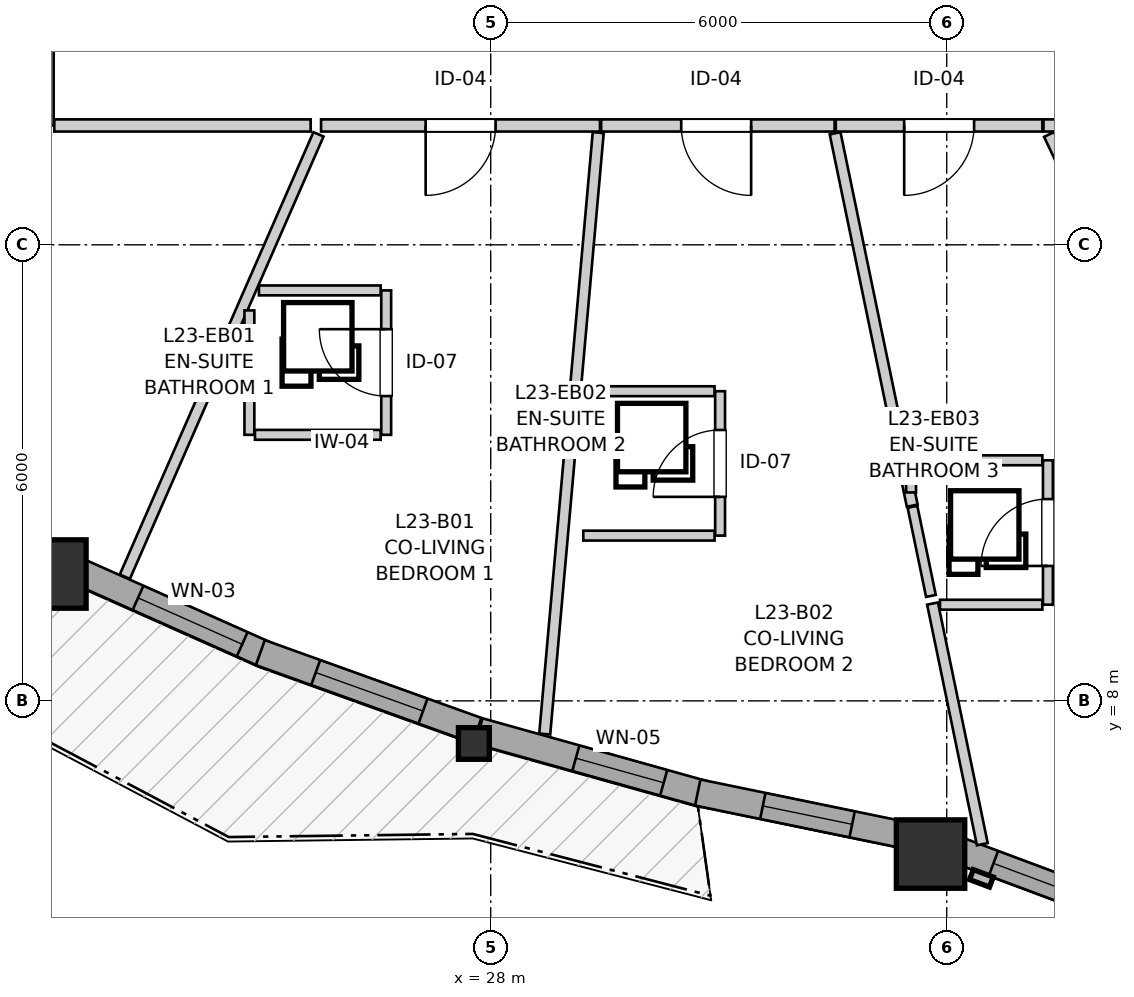
"""IFC4 building model, lengths in metres.
Left out: names, types, materials, properties, quantities, classifications, styles, units other than length and angle.
Written with IfcOpenShell. Run it as: python <this file> out.ifc"""

import sys

from ifc_helpers import new_model, si_unit, direction, frame, frame_2d, origin, origin_2d, place, context, subcontext, project, spatial, rectangle, i_section, extrude, source, transform, mapped, element, fill, save


model = new_model("IFC4")
c1 = context("Model", 3, precision=1e-05, world=origin(), true_north=direction((0.0, 1.0)))
c2 = subcontext(c1, "Body", "Model", "MODEL_VIEW")
j1 = project(units=[si_unit("LENGTHUNIT", "METRE"), si_unit("PLANEANGLEUNIT", "RADIAN")], contexts=[c1])
p1 = place(None, origin())
s1 = spatial("IfcSite", under=j1, at=p1, CompositionType="ELEMENT")
p2 = place(p1, origin())
s2 = spatial("IfcBuilding", under=s1, at=p2, CompositionType="ELEMENT")
p3 = place(p2, frame((0.0, 0.0, 80.0)))
s3 = spatial("IfcBuildingStorey", under=s2, at=p3, CompositionType="ELEMENT", Elevation=80.0)
m1 = source(origin(), c2, "Body", "SweptSolid", [
    extrude(rectangle(XDim=0.9, YDim=0.9, at=origin_2d()), origin(), (0.0, 0.0, 1.0), 2.935),
])
p4 = place(p3, frame((22.227, 9.669, 0.0), z_axis=(0.0, 0.0, 1.0), x_axis=(1.0, 0.0, 0.0)))
e1 = element("IfcColumn", 1, at=p4, inside=s3, PredefinedType="COLUMN", context=c2, shape_type="MappedRepresentation", body=[
    mapped(m1, transform((0.0, 0.0, 0.0), x_axis=(1.0, 0.0, 0.0), y_axis=(0.0, 1.0, 0.0), z_axis=(0.0, 0.0, 1.0), scale=1.0)),
])
m2 = source(origin(), c2, "Body", "SweptSolid", [
    extrude(i_section(OverallWidth=0.406, OverallDepth=0.416, WebThickness=0.027, FlangeThickness=0.044, FilletRadius=0.015, at=origin_2d()), origin(), (0.0, 0.0, 1.0), 2.935),
])
p5 = place(p3, frame((27.779, 7.439, 0.0), z_axis=(0.0, 0.0, 1.0), x_axis=(1.0, 0.0, 0.0)))
e2 = element("IfcColumn", 2, at=p5, inside=s3, PredefinedType="PILASTER", context=c2, shape_type="MappedRepresentation", body=[
    mapped(m2, transform((0.0, 0.0, 0.0), x_axis=(1.0, 0.0, 0.0), y_axis=(0.0, 1.0, 0.0), z_axis=(0.0, 0.0, 1.0), scale=1.0)),
])
p6 = place(p3, frame((33.787, 5.985, 0.0), z_axis=(0.0, 0.0, 1.0), x_axis=(1.0, 0.0, 0.0)))
e3 = element("IfcColumn", 3, at=p6, inside=s3, PredefinedType="COLUMN", context=c2, shape_type="MappedRepresentation", body=[
    mapped(m1, transform((0.0, 0.0, 0.0), x_axis=(1.0, 0.0, 0.0), y_axis=(0.0, 1.0, 0.0), z_axis=(0.0, 0.0, 1.0), scale=1.0)),
])
p7 = place(p3, frame((22.503, 9.737, 0.0), z_axis=(0.0, 0.0, 1.0), x_axis=(0.913443049169, -0.406966578388, 0.0)))
e4 = element("IfcWall", 4, at=p7, inside=s3, PredefinedType="SOLIDWALL", context=c2, shape_type="SweptSolid", body=[
    extrude(rectangle(XDim=2.79, YDim=0.35, at=frame_2d((1.395, 0.0))), origin(), (0.0, 0.0, 1.0), 2.465),
])
p8 = place(p7, frame((0.938, 0.0, 0.82)))
e5 = element("IfcOpeningElement", 5, at=p8, cuts=e4, PredefinedType="OPENING", context=c2, shape_type="SweptSolid", body=[
    extrude(rectangle(XDim=1.5, YDim=1.45, at=frame_2d((0.75, 0.725))), frame((0.0, 0.185, 0.0), z_axis=(0.0, -1.0, 0.0), x_axis=(1.0, 0.0, 0.0)), (0.0, 0.0, 1.0), 0.37),
])
p9 = place(p3, frame((24.969, 8.635, 0.0), z_axis=(0.0, 0.0, 1.0), x_axis=(0.941099972293, -0.338128440315, 0.0)))
e6 = element("IfcWall", 6, at=p9, inside=s3, PredefinedType="SOLIDWALL", context=c2, shape_type="SweptSolid", body=[
    extrude(rectangle(XDim=3.028, YDim=0.35, at=frame_2d((1.514, 0.0))), origin(), (0.0, 0.0, 1.0), 2.465),
])
p10 = place(p9, frame((0.774, 0.0, 0.82)))
e7 = element("IfcOpeningElement", 7, at=p10, cuts=e6, PredefinedType="OPENING", context=c2, shape_type="SweptSolid", body=[
    extrude(rectangle(XDim=1.5, YDim=1.45, at=frame_2d((0.75, 0.725))), frame((0.0, 0.185, 0.0), z_axis=(0.0, -1.0, 0.0), x_axis=(1.0, 0.0, 0.0)), (0.0, 0.0, 1.0), 0.37),
])
p11 = place(p3, frame((27.845, 7.603, 0.0), z_axis=(0.0, 0.0, 1.0), x_axis=(0.963041412051, -0.269353371382, 0.0)))
e8 = element("IfcWall", 8, at=p11, inside=s3, PredefinedType="SOLIDWALL", context=c2, shape_type="SweptSolid", body=[
    extrude(rectangle(XDim=3.078, YDim=0.35, at=frame_2d((1.539, 0.0))), origin(), (0.0, 0.0, 1.0), 2.465),
])
p12 = place(p11, frame((1.324, 0.0, 0.82)))
e9 = element("IfcOpeningElement", 9, at=p12, cuts=e8, PredefinedType="OPENING", context=c2, shape_type="SweptSolid", body=[
    extrude(rectangle(XDim=1.2, YDim=1.45, at=frame_2d((0.6, 0.725))), frame((0.0, 0.185, 0.0), z_axis=(0.0, -1.0, 0.0), x_axis=(1.0, 0.0, 0.0)), (0.0, 0.0, 1.0), 0.37),
])
p13 = place(p3, frame((30.724, 6.794, 0.0), z_axis=(0.0, 0.0, 1.0), x_axis=(0.979439663571, -0.201737317878, 0.0)))
e10 = element("IfcWall", 10, at=p13, inside=s3, PredefinedType="SOLIDWALL", context=c2, shape_type="SweptSolid", body=[
    extrude(rectangle(XDim=2.938, YDim=0.35, at=frame_2d((1.469, 0.0))), origin(), (0.0, 0.0, 1.0), 2.465),
])
p14 = place(p13, frame((0.874, 0.0, 0.82)))
e11 = element("IfcOpeningElement", 11, at=p14, cuts=e10, PredefinedType="OPENING", context=c2, shape_type="SweptSolid", body=[
    extrude(rectangle(XDim=1.2, YDim=1.45, at=frame_2d((0.6, 0.725))), frame((0.0, 0.185, 0.0), z_axis=(0.0, -1.0, 0.0), x_axis=(1.0, 0.0, 0.0)), (0.0, 0.0, 1.0), 0.37),
])
p15 = place(p3, frame((34.059, 6.07, 0.0), z_axis=(0.0, 0.0, 1.0), x_axis=(0.936803747811, -0.349855310219, 0.0)))
e12 = element("IfcWall", 12, at=p15, inside=s3, PredefinedType="SOLIDWALL", context=c2, shape_type="SweptSolid", body=[
    extrude(rectangle(XDim=1.836, YDim=0.35, at=frame_2d((0.918, 0.0))), origin(), (0.0, 0.0, 1.0), 2.465),
])
p16 = place(p15, frame((0.593, 0.0, 0.82)))
e13 = element("IfcOpeningElement", 13, at=p16, cuts=e12, PredefinedType="OPENING", context=c2, shape_type="SweptSolid", body=[
    extrude(rectangle(XDim=0.95, YDim=1.35, at=frame_2d((0.475, 0.675))), frame((0.0, 0.185, 0.0), z_axis=(0.0, -1.0, 0.0), x_axis=(1.0, 0.0, 0.0)), (0.0, 0.0, 1.0), 0.37),
])
p17 = place(p3, frame((22.17, 15.57, 0.0), z_axis=(0.0, 0.0, 1.0), x_axis=(0.0, 1.0, 0.0)))
e14 = element("IfcWall", 14, at=p17, inside=s3, PredefinedType="PARTITIONING", context=c2, shape_type="SweptSolid", body=[
    extrude(rectangle(XDim=5.543, YDim=0.16, at=frame_2d((2.771, 0.0))), origin(), (0.0, 0.0, 1.0), 2.935),
])
p18 = place(p17, frame((2.283, 0.0, 0.0)))
e15 = element("IfcOpeningElement", 15, at=p18, cuts=e14, PredefinedType="OPENING", context=c2, shape_type="SweptSolid", body=[
    extrude(rectangle(XDim=0.96, YDim=2.1, at=frame_2d((0.48, 1.05))), frame((0.0, 0.09, 0.0), z_axis=(0.0, -1.0, 0.0), x_axis=(1.0, 0.0, 0.0)), (0.0, 0.0, 1.0), 0.18),
])
p19 = place(p3, frame((29.438, 15.57, 0.0), z_axis=(0.0, 0.0, 1.0), x_axis=(-1.0, 0.0, 0.0)))
e16 = element("IfcWall", 16, at=p19, inside=s3, PredefinedType="PARTITIONING", context=c2, shape_type="SweptSolid", body=[
    extrude(rectangle(XDim=3.67, YDim=0.16, at=frame_2d((1.835, 0.0))), origin(), (0.0, 0.0, 1.0), 2.935),
])
p20 = place(p19, frame((1.374, 0.0, 0.0)))
e17 = element("IfcOpeningElement", 17, at=p20, cuts=e16, PredefinedType="OPENING", context=c2, shape_type="SweptSolid", body=[
    extrude(rectangle(XDim=0.92, YDim=2.1, at=frame_2d((0.46, 1.05))), frame((0.0, 0.09, 0.0), z_axis=(0.0, -1.0, 0.0), x_axis=(1.0, 0.0, 0.0)), (0.0, 0.0, 1.0), 0.18),
])
p21 = place(p3, frame((38.53, 15.57, 0.0), z_axis=(0.0, 0.0, 1.0), x_axis=(-1.0, 0.0, 0.0)))
e18 = element("IfcWall", 18, at=p21, inside=s3, PredefinedType="PARTITIONING", context=c2, shape_type="SweptSolid", body=[
    extrude(rectangle(XDim=3.257, YDim=0.16, at=frame_2d((1.628, 0.0))), origin(), (0.0, 0.0, 1.0), 2.935),
])
p22 = place(p21, frame((1.16, 0.0, 0.0)))
e19 = element("IfcOpeningElement", 19, at=p22, cuts=e18, PredefinedType="OPENING", context=c2, shape_type="SweptSolid", body=[
    extrude(rectangle(XDim=0.92, YDim=2.1, at=frame_2d((0.46, 1.05))), frame((0.0, 0.09, 0.0), z_axis=(0.0, -1.0, 0.0), x_axis=(1.0, 0.0, 0.0)), (0.0, 0.0, 1.0), 0.18),
])
p23 = place(p3, frame((32.525, 15.57, 0.0), z_axis=(0.0, 0.0, 1.0), x_axis=(-1.0, 0.0, 0.0)))
e20 = element("IfcWall", 20, at=p23, inside=s3, PredefinedType="PARTITIONING", context=c2, shape_type="SweptSolid", body=[
    extrude(rectangle(XDim=3.072, YDim=0.16, at=frame_2d((1.536, 0.0))), origin(), (0.0, 0.0, 1.0), 2.935),
])
p24 = place(p23, frame((1.098, 0.0, 0.0)))
e21 = element("IfcOpeningElement", 21, at=p24, cuts=e20, PredefinedType="OPENING", context=c2, shape_type="SweptSolid", body=[
    extrude(rectangle(XDim=0.92, YDim=2.1, at=frame_2d((0.46, 1.05))), frame((0.0, 0.09, 0.0), z_axis=(0.0, -1.0, 0.0), x_axis=(1.0, 0.0, 0.0)), (0.0, 0.0, 1.0), 0.18),
])
p25 = place(p3, frame((35.258, 15.57, 0.0), z_axis=(0.0, 0.0, 1.0), x_axis=(-1.0, 0.0, 0.0)))
e22 = element("IfcWall", 22, at=p25, inside=s3, PredefinedType="PARTITIONING", context=c2, shape_type="SweptSolid", body=[
    extrude(rectangle(XDim=2.718, YDim=0.16, at=frame_2d((1.359, 0.0))), origin(), (0.0, 0.0, 1.0), 2.935),
])
p26 = place(p25, frame((0.898, 0.0, 0.0)))
e23 = element("IfcOpeningElement", 23, at=p26, cuts=e22, PredefinedType="OPENING", context=c2, shape_type="SweptSolid", body=[
    extrude(rectangle(XDim=0.92, YDim=2.1, at=frame_2d((0.46, 1.05))), frame((0.0, 0.09, 0.0), z_axis=(0.0, -1.0, 0.0), x_axis=(1.0, 0.0, 0.0)), (0.0, 0.0, 1.0), 0.18),
])
p27 = place(p3, frame((26.625, 11.5, 0.0), z_axis=(0.0, 0.0, 1.0), x_axis=(0.0, 1.0, 0.0)))
e24 = element("IfcWall", 24, at=p27, inside=s3, PredefinedType="PARTITIONING", context=c2, shape_type="SweptSolid", body=[
    extrude(rectangle(XDim=1.9, YDim=0.13, at=frame_2d((0.95, 0.0))), origin(), (0.0, 0.0, 1.0), 2.935),
])
p28 = place(p27, frame((0.51, 0.0, 0.0)))
e25 = element("IfcOpeningElement", 25, at=p28, cuts=e24, PredefinedType="OPENING", context=c2, shape_type="SweptSolid", body=[
    extrude(rectangle(XDim=0.88, YDim=2.05, at=frame_2d((0.44, 1.025))), frame((0.0, 0.075, 0.0), z_axis=(0.0, -1.0, 0.0), x_axis=(1.0, 0.0, 0.0)), (0.0, 0.0, 1.0), 0.15),
])
p29 = place(p3, frame((31.018, 10.174, 0.0), z_axis=(0.0, 0.0, 1.0), x_axis=(0.0, 1.0, 0.0)))
e26 = element("IfcWall", 26, at=p29, inside=s3, PredefinedType="PARTITIONING", context=c2, shape_type="SweptSolid", body=[
    extrude(rectangle(XDim=1.9, YDim=0.13, at=frame_2d((0.95, 0.0))), origin(), (0.0, 0.0, 1.0), 2.935),
])
p30 = place(p29, frame((0.51, 0.0, 0.0)))
e27 = element("IfcOpeningElement", 27, at=p30, cuts=e26, PredefinedType="OPENING", context=c2, shape_type="SweptSolid", body=[
    extrude(rectangle(XDim=0.88, YDim=2.05, at=frame_2d((0.44, 1.025))), frame((0.0, 0.075, 0.0), z_axis=(0.0, -1.0, 0.0), x_axis=(1.0, 0.0, 0.0)), (0.0, 0.0, 1.0), 0.15),
])
p31 = place(p3, frame((35.331, 9.265, 0.0), z_axis=(0.0, 0.0, 1.0), x_axis=(0.0, 1.0, 0.0)))
e28 = element("IfcWall", 28, at=p31, inside=s3, PredefinedType="PARTITIONING", context=c2, shape_type="SweptSolid", body=[
    extrude(rectangle(XDim=1.9, YDim=0.13, at=frame_2d((0.95, 0.0))), origin(), (0.0, 0.0, 1.0), 2.935),
])
p32 = place(p31, frame((0.51, 0.0, 0.0)))
e29 = element("IfcOpeningElement", 29, at=p32, cuts=e28, PredefinedType="OPENING", context=c2, shape_type="SweptSolid", body=[
    extrude(rectangle(XDim=0.88, YDim=2.05, at=frame_2d((0.44, 1.025))), frame((0.0, 0.075, 0.0), z_axis=(0.0, -1.0, 0.0), x_axis=(1.0, 0.0, 0.0)), (0.0, 0.0, 1.0), 0.15),
])
p33 = place(p3, frame((28.711, 7.564, 0.0), z_axis=(0.0, 0.0, 1.0), x_axis=(0.088615013812, 0.996065951294, 0.0)))
e30 = element("IfcWall", 30, at=p33, inside=s3, PredefinedType="PARTITIONING", context=c2, shape_type="SweptSolid", body=[
    extrude(rectangle(XDim=7.943, YDim=0.145, at=frame_2d((3.971, 0.0))), origin(), (0.0, 0.0, 1.0), 2.935),
])
p34 = place(p3, frame((23.186, 9.634, 0.0), z_axis=(0.0, 0.0, 1.0), x_axis=(0.400994208685, 0.916080588486, 0.0)))
e31 = element("IfcWall", 31, at=p34, inside=s3, PredefinedType="PARTITIONING", context=c2, shape_type="SweptSolid", body=[
    extrude(rectangle(XDim=6.353, YDim=0.145, at=frame_2d((3.177, 0.0))), origin(), (0.0, 0.0, 1.0), 2.935),
])
p35 = place(p3, frame((32.531, 15.468, 0.0), z_axis=(0.0, 0.0, 1.0), x_axis=(0.202792769077, -0.979221677053, 0.0)))
e32 = element("IfcWall", 32, at=p35, inside=s3, PredefinedType="PARTITIONING", context=c2, shape_type="SweptSolid", body=[
    extrude(rectangle(XDim=5.003, YDim=0.145, at=frame_2d((2.502, 0.0))), origin(), (0.0, 0.0, 1.0), 2.935),
])
p36 = place(p3, frame((35.346, 15.452, 0.0), z_axis=(0.0, 0.0, 1.0), x_axis=(0.428023015228, -0.903767834366, 0.0)))
e33 = element("IfcWall", 33, at=p36, inside=s3, PredefinedType="PARTITIONING", context=c2, shape_type="SweptSolid", body=[
    extrude(rectangle(XDim=4.64, YDim=0.145, at=frame_2d((2.32, 0.0))), origin(), (0.0, 0.0, 1.0), 2.935),
])
p37 = place(p3, frame((22.258, 15.57, 0.0), z_axis=(0.0, 0.0, 1.0), x_axis=(1.0, 0.0, 0.0)))
e34 = element("IfcWall", 34, at=p37, inside=s3, PredefinedType="PARTITIONING", context=c2, shape_type="SweptSolid", body=[
    extrude(rectangle(XDim=3.373, YDim=0.16, at=frame_2d((1.687, 0.0))), origin(), (0.0, 0.0, 1.0), 2.935),
])
p38 = place(p3, frame((33.813, 9.28, 0.0), z_axis=(0.0, 0.0, 1.0), x_axis=(0.202648062782, -0.979251633979, 0.0)))
e35 = element("IfcWall", 35, at=p38, inside=s3, PredefinedType="PARTITIONING", context=c2, shape_type="SweptSolid", body=[
    extrude(rectangle(XDim=3.232, YDim=0.145, at=frame_2d((1.616, 0.0))), origin(), (0.0, 0.0, 1.0), 2.935),
])
p39 = place(p3, frame((24.825, 11.5, 0.0), z_axis=(0.0, 0.0, 1.0), x_axis=(0.0, 1.0, 0.0)))
e36 = element("IfcWall", 36, at=p39, inside=s3, PredefinedType="PARTITIONING", context=c2, shape_type="SweptSolid", body=[
    extrude(rectangle(XDim=1.637, YDim=0.13, at=frame_2d((0.818, 0.0))), origin(), (0.0, 0.0, 1.0), 2.935),
])
p40 = place(p3, frame((33.626, 11.165, 0.0), z_axis=(0.0, 0.0, 1.0), x_axis=(1.0, 0.0, 0.0)))
e37 = element("IfcWall", 37, at=p40, inside=s3, PredefinedType="PARTITIONING", context=c2, shape_type="SweptSolid", body=[
    extrude(rectangle(XDim=1.632, YDim=0.13, at=frame_2d((0.816, 0.0))), origin(), (0.0, 0.0, 1.0), 2.935),
])
p41 = place(p3, frame((24.898, 11.5, 0.0), z_axis=(0.0, 0.0, 1.0), x_axis=(1.0, 0.0, 0.0)))
e38 = element("IfcWall", 38, at=p41, inside=s3, PredefinedType="PARTITIONING", context=c2, shape_type="SweptSolid", body=[
    extrude(rectangle(XDim=1.654, YDim=0.13, at=frame_2d((0.827, 0.0))), origin(), (0.0, 0.0, 1.0), 2.543),
])
p42 = place(p3, frame((29.305, 12.074, 0.0), z_axis=(0.0, 0.0, 1.0), x_axis=(1.0, 0.0, 0.0)))
e39 = element("IfcWall", 39, at=p42, inside=s3, PredefinedType="PARTITIONING", context=c2, shape_type="SweptSolid", body=[
    extrude(rectangle(XDim=1.64, YDim=0.13, at=frame_2d((0.82, 0.0))), origin(), (0.0, 0.0, 1.0), 2.935),
])
p43 = place(p3, frame((29.218, 10.174, 0.0), z_axis=(0.0, 0.0, 1.0), x_axis=(1.0, 0.0, 0.0)))
e40 = element("IfcWall", 40, at=p43, inside=s3, PredefinedType="PARTITIONING", context=c2, shape_type="SweptSolid", body=[
    extrude(rectangle(XDim=1.727, YDim=0.13, at=frame_2d((0.864, 0.0))), origin(), (0.0, 0.0, 1.0), 2.543),
])
p44 = place(p3, frame((24.951, 13.4, 0.0), z_axis=(0.0, 0.0, 1.0), x_axis=(1.0, 0.0, 0.0)))
e41 = element("IfcWall", 41, at=p44, inside=s3, PredefinedType="PARTITIONING", context=c2, shape_type="SweptSolid", body=[
    extrude(rectangle(XDim=1.601, YDim=0.13, at=frame_2d((0.801, 0.0))), origin(), (0.0, 0.0, 1.0), 2.935),
])
p45 = place(p3, frame((33.912, 9.265, 0.0), z_axis=(0.0, 0.0, 1.0), x_axis=(1.0, 0.0, 0.0)))
e42 = element("IfcWall", 42, at=p45, inside=s3, PredefinedType="PARTITIONING", context=c2, shape_type="SweptSolid", body=[
    extrude(rectangle(XDim=1.346, YDim=0.13, at=frame_2d((0.673, 0.0))), origin(), (0.0, 0.0, 1.0), 2.935),
])
p46 = place(p3, frame((33.549, 10.553, 0.0), z_axis=(0.0, 0.0, 1.0), x_axis=(0.202855035592, -0.97920877985, 0.0)))
e43 = element("IfcWall", 43, at=p46, inside=s3, PredefinedType="PARTITIONING", context=c2, shape_type="SweptSolid", body=[
    extrude(rectangle(XDim=1.198, YDim=0.13, at=frame_2d((0.599, 0.0))), origin(), (0.0, 0.0, 1.0), 2.935),
])
p47 = place(p3, frame((33.531, 10.742, 0.0), z_axis=(0.0, 0.0, 1.0), x_axis=(0.0, 1.0, 0.0)))
e44 = element("IfcWall", 44, at=p47, inside=s3, PredefinedType="PARTITIONING", context=c2, shape_type="SweptSolid", body=[
    extrude(rectangle(XDim=0.35, YDim=0.13, at=frame_2d((0.175, 0.0))), origin(), (0.0, 0.0, 1.0), 2.935),
])
m3 = source(origin(), c2, "Body", "SweptSolid", [
    extrude(rectangle(XDim=1.5, YDim=1.45, at=frame_2d((0.75, 0.725))), frame((0.0, 0.03, 0.0), z_axis=(0.0, -1.0, 0.0), x_axis=(1.0, 0.0, 0.0)), (0.0, 0.0, 1.0), 0.06),
])
p48 = place(p8, origin())
e45 = element("IfcWindow", 45, at=p48, inside=s3, PartitioningType="SINGLE_PANEL", PredefinedType="WINDOW", context=c2, shape_type="MappedRepresentation", body=[
    mapped(m3, transform((0.0, 0.0, 0.0), x_axis=(1.0, 0.0, 0.0), y_axis=(0.0, 1.0, 0.0), z_axis=(0.0, 0.0, 1.0), scale=1.0)),
])
fill(e5, e45)
p49 = place(p10, origin())
e46 = element("IfcWindow", 46, at=p49, inside=s3, PartitioningType="SINGLE_PANEL", PredefinedType="WINDOW", context=c2, shape_type="MappedRepresentation", body=[
    mapped(m3, transform((0.0, 0.0, 0.0), x_axis=(1.0, 0.0, 0.0), y_axis=(0.0, 1.0, 0.0), z_axis=(0.0, 0.0, 1.0), scale=1.0)),
])
fill(e7, e46)
m4 = source(origin(), c2, "Body", "SweptSolid", [
    extrude(rectangle(XDim=1.2, YDim=1.45, at=frame_2d((0.6, 0.725))), frame((0.0, 0.03, 0.0), z_axis=(0.0, -1.0, 0.0), x_axis=(1.0, 0.0, 0.0)), (0.0, 0.0, 1.0), 0.06),
])
p50 = place(p12, origin())
e47 = element("IfcWindow", 47, at=p50, inside=s3, PartitioningType="SINGLE_PANEL", PredefinedType="WINDOW", context=c2, shape_type="MappedRepresentation", body=[
    mapped(m4, transform((0.0, 0.0, 0.0), x_axis=(1.0, 0.0, 0.0), y_axis=(0.0, 1.0, 0.0), z_axis=(0.0, 0.0, 1.0), scale=1.0)),
])
fill(e9, e47)
p51 = place(p14, origin())
e48 = element("IfcWindow", 48, at=p51, inside=s3, PartitioningType="SINGLE_PANEL", PredefinedType="WINDOW", context=c2, shape_type="MappedRepresentation", body=[
    mapped(m4, transform((0.0, 0.0, 0.0), x_axis=(1.0, 0.0, 0.0), y_axis=(0.0, 1.0, 0.0), z_axis=(0.0, 0.0, 1.0), scale=1.0)),
])
fill(e11, e48)
m5 = source(origin(), c2, "Body", "SweptSolid", [
    extrude(rectangle(XDim=0.95, YDim=1.35, at=frame_2d((0.475, 0.675))), frame((0.0, 0.03, 0.0), z_axis=(0.0, -1.0, 0.0), x_axis=(1.0, 0.0, 0.0)), (0.0, 0.0, 1.0), 0.06),
])
p52 = place(p16, origin())
e49 = element("IfcWindow", 49, at=p52, inside=s3, PartitioningType="SINGLE_PANEL", PredefinedType="WINDOW", context=c2, shape_type="MappedRepresentation", body=[
    mapped(m5, transform((0.0, 0.0, 0.0), x_axis=(1.0, 0.0, 0.0), y_axis=(0.0, 1.0, 0.0), z_axis=(0.0, 0.0, 1.0), scale=1.0)),
])
fill(e13, e49)
m6 = source(origin(), c2, "Body", "SweptSolid", [
    extrude(rectangle(XDim=0.92, YDim=2.1, at=frame_2d((0.46, 1.05))), frame((0.0, 0.025, 0.0), z_axis=(0.0, -1.0, 0.0), x_axis=(1.0, 0.0, 0.0)), (0.0, 0.0, 1.0), 0.05),
])
p53 = place(p20, origin())
e50 = element("IfcDoor", 50, at=p53, inside=s3, OperationType="SINGLE_SWING_RIGHT", PredefinedType="DOOR", context=c2, shape_type="MappedRepresentation", body=[
    mapped(m6, transform((0.0, 0.0, 0.0), x_axis=(1.0, 0.0, 0.0), y_axis=(0.0, 1.0, 0.0), z_axis=(0.0, 0.0, 1.0), scale=1.0)),
])
fill(e17, e50)
p54 = place(p24, origin())
e51 = element("IfcDoor", 51, at=p54, inside=s3, OperationType="SINGLE_SWING_LEFT", PredefinedType="DOOR", context=c2, shape_type="MappedRepresentation", body=[
    mapped(m6, transform((0.0, 0.0, 0.0), x_axis=(1.0, 0.0, 0.0), y_axis=(0.0, 1.0, 0.0), z_axis=(0.0, 0.0, 1.0), scale=1.0)),
])
fill(e21, e51)
p55 = place(p26, origin())
e52 = element("IfcDoor", 52, at=p55, inside=s3, OperationType="SINGLE_SWING_RIGHT", PredefinedType="DOOR", context=c2, shape_type="MappedRepresentation", body=[
    mapped(m6, transform((0.0, 0.0, 0.0), x_axis=(1.0, 0.0, 0.0), y_axis=(0.0, 1.0, 0.0), z_axis=(0.0, 0.0, 1.0), scale=1.0)),
])
fill(e23, e52)
m7 = source(origin(), c2, "Body", "SweptSolid", [
    extrude(rectangle(XDim=0.88, YDim=2.05, at=frame_2d((0.44, 1.025))), frame((0.0, 0.025, 0.0), z_axis=(0.0, -1.0, 0.0), x_axis=(1.0, 0.0, 0.0)), (0.0, 0.0, 1.0), 0.05),
])
p56 = place(p28, origin())
e53 = element("IfcDoor", 53, at=p56, inside=s3, OperationType="SINGLE_SWING_RIGHT", PredefinedType="DOOR", context=c2, shape_type="MappedRepresentation", body=[
    mapped(m7, transform((0.0, 0.0, 0.0), x_axis=(1.0, 0.0, 0.0), y_axis=(0.0, 1.0, 0.0), z_axis=(0.0, 0.0, 1.0), scale=1.0)),
])
fill(e25, e53)
p57 = place(p30, origin())
e54 = element("IfcDoor", 54, at=p57, inside=s3, OperationType="SINGLE_SWING_LEFT", PredefinedType="DOOR", context=c2, shape_type="MappedRepresentation", body=[
    mapped(m7, transform((0.0, 0.0, 0.0), x_axis=(1.0, 0.0, 0.0), y_axis=(0.0, 1.0, 0.0), z_axis=(0.0, 0.0, 1.0), scale=1.0)),
])
fill(e27, e54)
p58 = place(p32, origin())
e55 = element("IfcDoor", 55, at=p58, inside=s3, OperationType="SINGLE_SWING_LEFT", PredefinedType="DOOR", context=c2, shape_type="MappedRepresentation", body=[
    mapped(m7, transform((0.0, 0.0, 0.0), x_axis=(1.0, 0.0, 0.0), y_axis=(0.0, 1.0, 0.0), z_axis=(0.0, 0.0, 1.0), scale=1.0)),
])
fill(e29, e55)
save(model, sys.argv[1])
